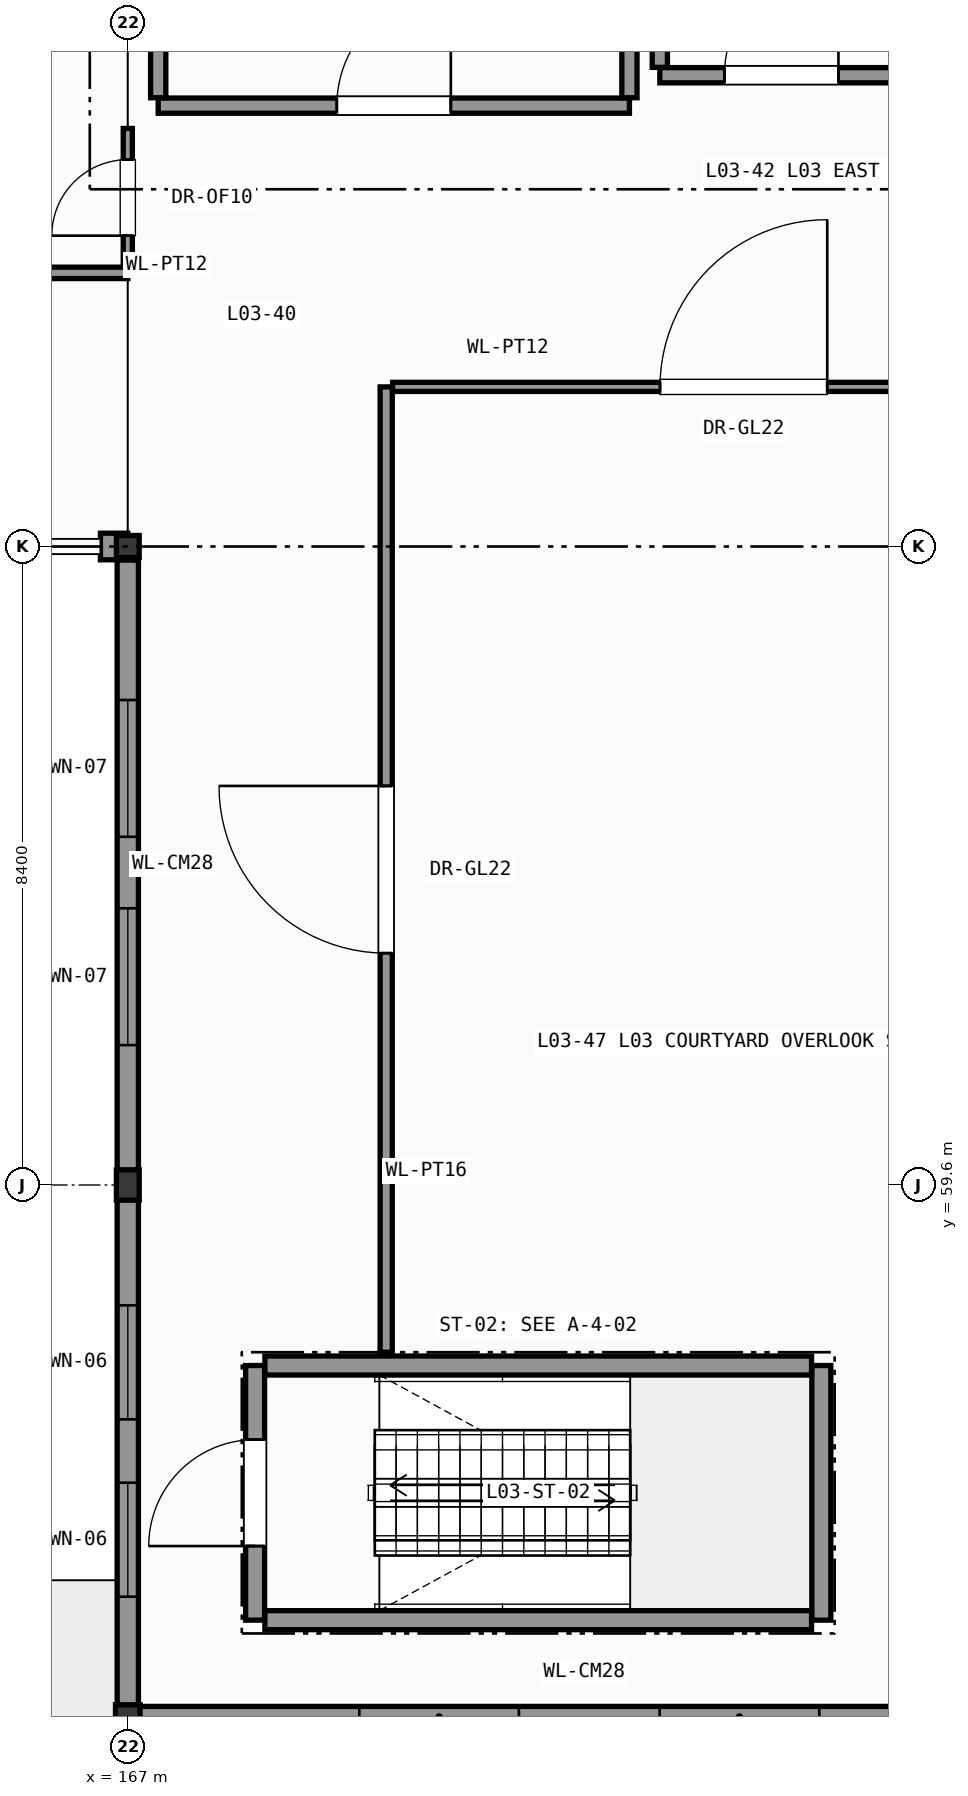
"""IFC4 building model, lengths in metres.
Left out: names, types, materials, properties, quantities, classifications, styles, units other than length and angle.
Written with IfcOpenShell. Run it as: python <this file> out.ifc"""

import sys

from ifc_helpers import new_model, si_unit, direction, frame, frame_2d, origin, origin_2d, place, context, subcontext, project, spatial, rectangle, hollow_circle, i_section, extrude, element, fill, save


model = new_model("IFC4")
c1 = context("Model", 3, precision=1e-05, world=origin(), true_north=direction((0.0, 1.0)))
c2 = subcontext(c1, "Body", "Model", "MODEL_VIEW")
j1 = project(units=[si_unit("LENGTHUNIT", "METRE"), si_unit("PLANEANGLEUNIT", "RADIAN")], contexts=[c1])
p1 = place(None, origin())
s1 = spatial("IfcSite", under=j1, at=p1, CompositionType="ELEMENT")
p2 = place(p1, origin())
s2 = spatial("IfcBuilding", under=s1, at=p2, CompositionType="ELEMENT")
p3 = place(p2, frame((0.0, 0.0, 13.2)))
s3 = spatial("IfcBuildingStorey", under=s2, at=p3, CompositionType="ELEMENT", Elevation=13.2)
p4 = place(p3, frame((167.0, 52.6, 0.0), z_axis=(0.0, 0.0, 1.0), x_axis=(1.0, 0.0, 0.0)))
e1 = element("IfcColumn", 1, at=p4, inside=s3, PredefinedType="COLUMN", context=c2, shape_type="SweptSolid", body=[
    extrude(hollow_circle(Radius=0.162, WallThickness=0.016, at=origin_2d()), origin(), (0.0, 0.0, 1.0), 4.8),
])
p5 = place(p3, frame((167.0, 59.6, 0.0), z_axis=(0.0, 0.0, 1.0), x_axis=(1.0, 0.0, 0.0)))
e2 = element("IfcColumn", 2, at=p5, inside=s3, PredefinedType="COLUMN", context=c2, shape_type="SweptSolid", body=[
    extrude(i_section(OverallWidth=0.3, OverallDepth=0.4, WebThickness=0.013, FlangeThickness=0.024, FilletRadius=0.027, at=origin_2d()), origin(), (0.0, 0.0, 1.0), 4.8),
])
p6 = place(p3, frame((167.0, 68.0, 0.0), z_axis=(0.0, 0.0, 1.0), x_axis=(1.0, 0.0, 0.0)))
e3 = element("IfcColumn", 3, at=p6, inside=s3, PredefinedType="COLUMN", context=c2, shape_type="SweptSolid", body=[
    extrude(i_section(OverallWidth=0.3, OverallDepth=0.29, WebThickness=0.009, FlangeThickness=0.014, FilletRadius=0.027, at=origin_2d()), origin(), (0.0, 0.0, 1.0), 4.8),
])
p7 = place(p3, frame((166.64, 68.0, 0.0), z_axis=(0.0, 0.0, 1.0), x_axis=(1.0, 0.0, 0.0)))
e4 = element("IfcWall", 4, at=p7, inside=s3, PredefinedType="SOLIDWALL", context=c2, shape_type="SweptSolid", body=[
    extrude(rectangle(XDim=0.36, YDim=0.35, at=frame_2d((0.18, 0.0))), origin(), (0.0, 0.0, 1.0), 3.955),
])
p8 = place(p3, frame((167.0, 59.6, 0.0), z_axis=(0.0, 0.0, 1.0), x_axis=(0.0, 1.0, 0.0)))
e5 = element("IfcWall", 5, at=p8, inside=s3, PredefinedType="SOLIDWALL", context=c2, shape_type="SweptSolid", body=[
    extrude(rectangle(XDim=8.221, YDim=0.28, at=frame_2d((4.11, 0.0))), origin(), (0.0, 0.0, 1.0), 4.065),
])
p9 = place(p8, frame((1.84, 0.0, 0.95)))
e6 = element("IfcOpeningElement", 6, at=p9, cuts=e5, PredefinedType="OPENING", context=c2, shape_type="SweptSolid", body=[
    extrude(rectangle(XDim=1.8, YDim=2.6, at=frame_2d((0.9, 1.3))), frame((0.0, 0.15, 0.0), z_axis=(0.0, -1.0, 0.0), x_axis=(1.0, 0.0, 0.0)), (0.0, 0.0, 1.0), 0.3),
])
p10 = place(p8, frame((4.581, 0.0, 0.95)))
e7 = element("IfcOpeningElement", 7, at=p10, cuts=e5, PredefinedType="OPENING", context=c2, shape_type="SweptSolid", body=[
    extrude(rectangle(XDim=1.8, YDim=2.6, at=frame_2d((0.9, 1.3))), frame((0.0, 0.15, 0.0), z_axis=(0.0, -1.0, 0.0), x_axis=(1.0, 0.0, 0.0)), (0.0, 0.0, 1.0), 0.3),
])
p11 = place(p3, frame((167.0, 52.6, 0.0), z_axis=(0.0, 0.0, 1.0), x_axis=(0.0, 1.0, 0.0)))
e8 = element("IfcWall", 8, at=p11, inside=s3, PredefinedType="SOLIDWALL", context=c2, shape_type="SweptSolid", body=[
    extrude(rectangle(XDim=7.0, YDim=0.28, at=frame_2d((3.5, 0.0))), origin(), (0.0, 0.0, 1.0), 4.215),
])
p12 = place(p11, frame((1.583, 0.0, 0.95)))
e9 = element("IfcOpeningElement", 9, at=p12, cuts=e8, PredefinedType="OPENING", context=c2, shape_type="SweptSolid", body=[
    extrude(rectangle(XDim=1.5, YDim=2.4, at=frame_2d((0.75, 1.2))), frame((0.0, 0.15, 0.0), z_axis=(0.0, -1.0, 0.0), x_axis=(1.0, 0.0, 0.0)), (0.0, 0.0, 1.0), 0.3),
])
p13 = place(p11, frame((3.917, 0.0, 0.95)))
e10 = element("IfcOpeningElement", 10, at=p13, cuts=e8, PredefinedType="OPENING", context=c2, shape_type="SweptSolid", body=[
    extrude(rectangle(XDim=1.5, YDim=2.4, at=frame_2d((0.75, 1.2))), frame((0.0, 0.15, 0.0), z_axis=(0.0, -1.0, 0.0), x_axis=(1.0, 0.0, 0.0)), (0.0, 0.0, 1.0), 0.3),
])
p14 = place(p3, frame((179.0, 52.6, 0.0), z_axis=(0.0, 0.0, 1.0), x_axis=(-1.0, 0.0, 0.0)))
e11 = element("IfcWall", 11, at=p14, inside=s3, PredefinedType="SOLIDWALL", context=c2, shape_type="SweptSolid", body=[
    extrude(rectangle(XDim=11.856, YDim=0.28, at=frame_2d((5.928, 0.0))), origin(), (0.0, 0.0, 1.0), 3.955),
])
p15 = place(p14, frame((2.902, 0.0, 0.95)))
e12 = element("IfcOpeningElement", 12, at=p15, cuts=e11, PredefinedType="OPENING", context=c2, shape_type="SweptSolid", body=[
    extrude(rectangle(XDim=2.1, YDim=2.61, at=frame_2d((1.05, 1.305))), frame((0.0, 0.15, 0.0), z_axis=(0.0, -1.0, 0.0), x_axis=(1.0, 0.0, 0.0)), (0.0, 0.0, 1.0), 0.3),
])
p16 = place(p14, frame((6.854, 0.0, 0.95)))
e13 = element("IfcOpeningElement", 13, at=p16, cuts=e11, PredefinedType="OPENING", context=c2, shape_type="SweptSolid", body=[
    extrude(rectangle(XDim=2.1, YDim=2.61, at=frame_2d((1.05, 1.305))), frame((0.0, 0.15, 0.0), z_axis=(0.0, -1.0, 0.0), x_axis=(1.0, 0.0, 0.0)), (0.0, 0.0, 1.0), 0.3),
])
p17 = place(p3, frame((168.675, 53.875, 0.0), z_axis=(0.0, 0.0, 1.0), x_axis=(0.0, 1.0, 0.0)))
e14 = element("IfcWall", 14, at=p17, inside=s3, PredefinedType="SHEAR", context=c2, shape_type="SweptSolid", body=[
    extrude(rectangle(XDim=3.35, YDim=0.25, at=frame_2d((1.675, 0.0))), origin(), (0.0, 0.0, 1.0), 4.56),
])
p18 = place(p17, frame((0.975, 0.0, 0.0)))
e15 = element("IfcOpeningElement", 15, at=p18, cuts=e14, PredefinedType="OPENING", context=c2, shape_type="SweptSolid", body=[
    extrude(rectangle(XDim=1.4, YDim=2.2, at=frame_2d((0.7, 1.1))), frame((0.0, 0.135, 0.0), z_axis=(0.0, -1.0, 0.0), x_axis=(1.0, 0.0, 0.0)), (0.0, 0.0, 1.0), 0.27),
])
p19 = place(p3, frame((176.125, 53.875, 0.0), z_axis=(0.0, 0.0, 1.0), x_axis=(0.0, 1.0, 0.0)))
e16 = element("IfcWall", 16, at=p19, inside=s3, PredefinedType="SHEAR", context=c2, shape_type="SweptSolid", body=[
    extrude(rectangle(XDim=3.35, YDim=0.25, at=frame_2d((1.675, 0.0))), origin(), (0.0, 0.0, 1.0), 4.56),
])
for number, where, z_axis, x_axis in (
    (17, (168.804, 53.875, 0.0), (0.0, 0.0, 1.0), (1.0, 0.0, 0.0)),
    (18, (168.804, 57.225, 0.0), (0.0, 0.0, 1.0), (1.0, 0.0, 0.0)),
):
    element("IfcWall", number, at=place(p3, frame(where, z_axis=z_axis, x_axis=x_axis)), inside=s3, PredefinedType="SHEAR", context=c2, shape_type="SweptSolid", body=[
        extrude(rectangle(XDim=7.192, YDim=0.25, at=frame_2d((3.596, 0.0))), origin(), (0.0, 0.0, 1.0), 4.56),
    ])
p20 = place(p3, frame((167.4, 73.8, 0.0), z_axis=(0.0, 0.0, 1.0), x_axis=(1.0, 0.0, 0.0)))
e19 = element("IfcWall", 19, at=p20, inside=s3, PredefinedType="PARTITIONING", context=c2, shape_type="SweptSolid", body=[
    extrude(rectangle(XDim=6.2, YDim=0.2, at=frame_2d((3.1, 0.0))), origin(), (0.0, 0.0, 1.0), 4.145),
])
p21 = place(p20, frame((2.35, 0.0, 0.0)))
e20 = element("IfcOpeningElement", 20, at=p21, cuts=e19, PredefinedType="OPENING", context=c2, shape_type="SweptSolid", body=[
    extrude(rectangle(XDim=1.5, YDim=2.2, at=frame_2d((0.75, 1.1))), frame((0.0, 0.11, 0.0), z_axis=(0.0, -1.0, 0.0), x_axis=(1.0, 0.0, 0.0)), (0.0, 0.0, 1.0), 0.22),
])
for number, where, z_axis, x_axis in (
    (21, (167.4, 73.904, 0.0), (0.0, 0.0, 1.0), (0.0, 1.0, 0.0)),
    (22, (173.6, 73.904, 0.0), (0.0, 0.0, 1.0), (0.0, 1.0, 0.0)),
):
    element("IfcWall", number, at=place(p3, frame(where, z_axis=z_axis, x_axis=x_axis)), inside=s3, PredefinedType="PARTITIONING", context=c2, shape_type="SweptSolid", body=[
        extrude(rectangle(XDim=4.296, YDim=0.2, at=frame_2d((2.148, 0.0))), origin(), (0.0, 0.0, 1.0), 4.56),
    ])
p22 = place(p3, frame((174.0, 74.2, 0.0), z_axis=(0.0, 0.0, 1.0), x_axis=(1.0, 0.0, 0.0)))
e23 = element("IfcWall", 23, at=p22, inside=s3, PredefinedType="PARTITIONING", context=c2, shape_type="SweptSolid", body=[
    extrude(rectangle(XDim=3.2, YDim=0.2, at=frame_2d((1.6, 0.0))), origin(), (0.0, 0.0, 1.0), 4.56),
])
p23 = place(p22, frame((0.85, 0.0, 0.0)))
e24 = element("IfcOpeningElement", 24, at=p23, cuts=e23, PredefinedType="OPENING", context=c2, shape_type="SweptSolid", body=[
    extrude(rectangle(XDim=1.5, YDim=2.2, at=frame_2d((0.75, 1.1))), frame((0.0, 0.11, 0.0), z_axis=(0.0, -1.0, 0.0), x_axis=(1.0, 0.0, 0.0)), (0.0, 0.0, 1.0), 0.22),
])
p24 = place(p3, frame((174.0, 74.304, 0.0), z_axis=(0.0, 0.0, 1.0), x_axis=(0.0, 1.0, 0.0)))
e25 = element("IfcWall", 25, at=p24, inside=s3, PredefinedType="PARTITIONING", context=c2, shape_type="SweptSolid", body=[
    extrude(rectangle(XDim=3.896, YDim=0.2, at=frame_2d((1.948, 0.0))), origin(), (0.0, 0.0, 1.0), 4.56),
])
p25 = place(p3, frame((126.0, 71.6, 0.0), z_axis=(0.0, 0.0, 1.0), x_axis=(1.0, 0.0, 0.0)))
e26 = element("IfcWall", 26, at=p25, inside=s3, PredefinedType="PARTITIONING", context=c2, shape_type="SweptSolid", body=[
    extrude(rectangle(XDim=41.0, YDim=0.15, at=frame_2d((20.5, 0.0))), origin(), (0.0, 0.0, 1.0), 4.56),
])
p26 = place(p25, frame((19.4, 0.0, 0.0)))
e27 = element("IfcOpeningElement", 27, at=p26, cuts=e26, PredefinedType="OPENING", context=c2, shape_type="SweptSolid", body=[
    extrude(rectangle(XDim=2.2, YDim=2.6, at=frame_2d((1.1, 1.3))), frame((0.0, 0.085, 0.0), z_axis=(0.0, -1.0, 0.0), x_axis=(1.0, 0.0, 0.0)), (0.0, 0.0, 1.0), 0.17),
])
p27 = place(p3, frame((167.0, 71.679, 0.0), z_axis=(0.0, 0.0, 1.0), x_axis=(0.0, 1.0, 0.0)))
e28 = element("IfcWall", 28, at=p27, inside=s3, PredefinedType="PARTITIONING", context=c2, shape_type="SweptSolid", body=[
    extrude(rectangle(XDim=1.821, YDim=0.12, at=frame_2d((0.911, 0.0))), origin(), (0.0, 0.0, 1.0), 4.065),
])
p28 = place(p27, frame((0.41, 0.0, 0.0)))
e29 = element("IfcOpeningElement", 29, at=p28, cuts=e28, PredefinedType="OPENING", context=c2, shape_type="SweptSolid", body=[
    extrude(rectangle(XDim=1.0, YDim=2.15, at=frame_2d((0.5, 1.075))), frame((0.0, 0.07, 0.0), z_axis=(0.0, -1.0, 0.0), x_axis=(1.0, 0.0, 0.0)), (0.0, 0.0, 1.0), 0.14),
])
p29 = place(p3, frame((170.4, 57.4, 0.0), z_axis=(0.0, 0.0, 1.0), x_axis=(0.0, 1.0, 0.0)))
e30 = element("IfcWall", 30, at=p29, inside=s3, PredefinedType="PARTITIONING", context=c2, shape_type="SweptSolid", body=[
    extrude(rectangle(XDim=12.7, YDim=0.16, at=frame_2d((6.35, 0.0))), origin(), (0.0, 0.0, 1.0), 4.56),
])
p30 = place(p29, frame((5.25, 0.0, 0.0)))
e31 = element("IfcOpeningElement", 31, at=p30, cuts=e30, PredefinedType="OPENING", context=c2, shape_type="SweptSolid", body=[
    extrude(rectangle(XDim=2.2, YDim=2.6, at=frame_2d((1.1, 1.3))), frame((0.0, 0.09, 0.0), z_axis=(0.0, -1.0, 0.0), x_axis=(1.0, 0.0, 0.0)), (0.0, 0.0, 1.0), 0.18),
])
p31 = place(p3, frame((170.484, 70.1, 0.0), z_axis=(0.0, 0.0, 1.0), x_axis=(1.0, 0.0, 0.0)))
e32 = element("IfcWall", 32, at=p31, inside=s3, PredefinedType="PARTITIONING", context=c2, shape_type="SweptSolid", body=[
    extrude(rectangle(XDim=9.237, YDim=0.12, at=frame_2d((4.619, 0.0))), origin(), (0.0, 0.0, 1.0), 4.56),
])
p32 = place(p31, frame((3.519, 0.0, 0.0)))
e33 = element("IfcOpeningElement", 33, at=p32, cuts=e32, PredefinedType="OPENING", context=c2, shape_type="SweptSolid", body=[
    extrude(rectangle(XDim=2.2, YDim=2.6, at=frame_2d((1.1, 1.3))), frame((0.0, 0.07, 0.0), z_axis=(0.0, -1.0, 0.0), x_axis=(1.0, 0.0, 0.0)), (0.0, 0.0, 1.0), 0.14),
])
p33 = place(p9, origin())
e34 = element("IfcWindow", 34, at=p33, inside=s3, PartitioningType="SINGLE_PANEL", PredefinedType="WINDOW", context=c2, shape_type="SweptSolid", body=[
    extrude(rectangle(XDim=1.8, YDim=2.6, at=frame_2d((0.9, 1.3))), frame((0.0, 0.03, 0.0), z_axis=(0.0, -1.0, 0.0), x_axis=(1.0, 0.0, 0.0)), (0.0, 0.0, 1.0), 0.06),
])
fill(e6, e34)
p34 = place(p10, origin())
e35 = element("IfcWindow", 35, at=p34, inside=s3, PartitioningType="SINGLE_PANEL", PredefinedType="WINDOW", context=c2, shape_type="SweptSolid", body=[
    extrude(rectangle(XDim=1.8, YDim=2.6, at=frame_2d((0.9, 1.3))), frame((0.0, 0.03, 0.0), z_axis=(0.0, -1.0, 0.0), x_axis=(1.0, 0.0, 0.0)), (0.0, 0.0, 1.0), 0.06),
])
fill(e7, e35)
p35 = place(p12, origin())
e36 = element("IfcWindow", 36, at=p35, inside=s3, PartitioningType="SINGLE_PANEL", PredefinedType="WINDOW", context=c2, shape_type="SweptSolid", body=[
    extrude(rectangle(XDim=1.5, YDim=2.4, at=frame_2d((0.75, 1.2))), frame((0.0, 0.03, 0.0), z_axis=(0.0, -1.0, 0.0), x_axis=(1.0, 0.0, 0.0)), (0.0, 0.0, 1.0), 0.06),
])
fill(e9, e36)
p36 = place(p13, origin())
e37 = element("IfcWindow", 37, at=p36, inside=s3, PartitioningType="SINGLE_PANEL", PredefinedType="WINDOW", context=c2, shape_type="SweptSolid", body=[
    extrude(rectangle(XDim=1.5, YDim=2.4, at=frame_2d((0.75, 1.2))), frame((0.0, 0.03, 0.0), z_axis=(0.0, -1.0, 0.0), x_axis=(1.0, 0.0, 0.0)), (0.0, 0.0, 1.0), 0.06),
])
fill(e10, e37)
p37 = place(p15, origin())
e38 = element("IfcWindow", 38, at=p37, inside=s3, PartitioningType="SINGLE_PANEL", PredefinedType="WINDOW", context=c2, shape_type="SweptSolid", body=[
    extrude(rectangle(XDim=2.1, YDim=2.61, at=frame_2d((1.05, 1.305))), frame((0.0, 0.03, 0.0), z_axis=(0.0, -1.0, 0.0), x_axis=(1.0, 0.0, 0.0)), (0.0, 0.0, 1.0), 0.06),
])
fill(e12, e38)
p38 = place(p16, origin())
e39 = element("IfcWindow", 39, at=p38, inside=s3, PartitioningType="SINGLE_PANEL", PredefinedType="WINDOW", context=c2, shape_type="SweptSolid", body=[
    extrude(rectangle(XDim=2.1, YDim=2.61, at=frame_2d((1.05, 1.305))), frame((0.0, 0.03, 0.0), z_axis=(0.0, -1.0, 0.0), x_axis=(1.0, 0.0, 0.0)), (0.0, 0.0, 1.0), 0.06),
])
fill(e13, e39)
p39 = place(p18, origin())
e40 = element("IfcDoor", 40, at=p39, inside=s3, OperationType="SINGLE_SWING_LEFT", PredefinedType="DOOR", context=c2, shape_type="SweptSolid", body=[
    extrude(rectangle(XDim=1.4, YDim=2.2, at=frame_2d((0.7, 1.1))), frame((0.0, 0.025, 0.0), z_axis=(0.0, -1.0, 0.0), x_axis=(1.0, 0.0, 0.0)), (0.0, 0.0, 1.0), 0.05),
])
fill(e15, e40)
p40 = place(p21, origin())
e41 = element("IfcDoor", 41, at=p40, inside=s3, OperationType="SINGLE_SWING_RIGHT", PredefinedType="DOOR", context=c2, shape_type="SweptSolid", body=[
    extrude(rectangle(XDim=1.5, YDim=2.2, at=frame_2d((0.75, 1.1))), frame((0.0, 0.025, 0.0), z_axis=(0.0, -1.0, 0.0), x_axis=(1.0, 0.0, 0.0)), (0.0, 0.0, 1.0), 0.05),
])
fill(e20, e41)
p41 = place(p23, origin())
e42 = element("IfcDoor", 42, at=p41, inside=s3, OperationType="SINGLE_SWING_RIGHT", PredefinedType="DOOR", context=c2, shape_type="SweptSolid", body=[
    extrude(rectangle(XDim=1.5, YDim=2.2, at=frame_2d((0.75, 1.1))), frame((0.0, 0.025, 0.0), z_axis=(0.0, -1.0, 0.0), x_axis=(1.0, 0.0, 0.0)), (0.0, 0.0, 1.0), 0.05),
])
fill(e24, e42)
p42 = place(p28, origin())
e43 = element("IfcDoor", 43, at=p42, inside=s3, OperationType="SINGLE_SWING_LEFT", PredefinedType="DOOR", context=c2, shape_type="SweptSolid", body=[
    extrude(rectangle(XDim=1.0, YDim=2.15, at=frame_2d((0.5, 1.075))), frame((0.0, 0.025, 0.0), z_axis=(0.0, -1.0, 0.0), x_axis=(1.0, 0.0, 0.0)), (0.0, 0.0, 1.0), 0.05),
])
fill(e29, e43)
p43 = place(p30, origin())
e44 = element("IfcDoor", 44, at=p43, inside=s3, OperationType="SINGLE_SWING_RIGHT", PredefinedType="DOOR", context=c2, shape_type="SweptSolid", body=[
    extrude(rectangle(XDim=2.2, YDim=2.6, at=frame_2d((1.1, 1.3))), frame((0.0, 0.025, 0.0), z_axis=(0.0, -1.0, 0.0), x_axis=(1.0, 0.0, 0.0)), (0.0, 0.0, 1.0), 0.05),
])
fill(e31, e44)
p44 = place(p32, origin())
e45 = element("IfcDoor", 45, at=p44, inside=s3, OperationType="SINGLE_SWING_RIGHT", PredefinedType="DOOR", context=c2, shape_type="SweptSolid", body=[
    extrude(rectangle(XDim=2.2, YDim=2.6, at=frame_2d((1.1, 1.3))), frame((0.0, 0.025, 0.0), z_axis=(0.0, -1.0, 0.0), x_axis=(1.0, 0.0, 0.0)), (0.0, 0.0, 1.0), 0.05),
])
fill(e33, e45)
save(model, sys.argv[1])
